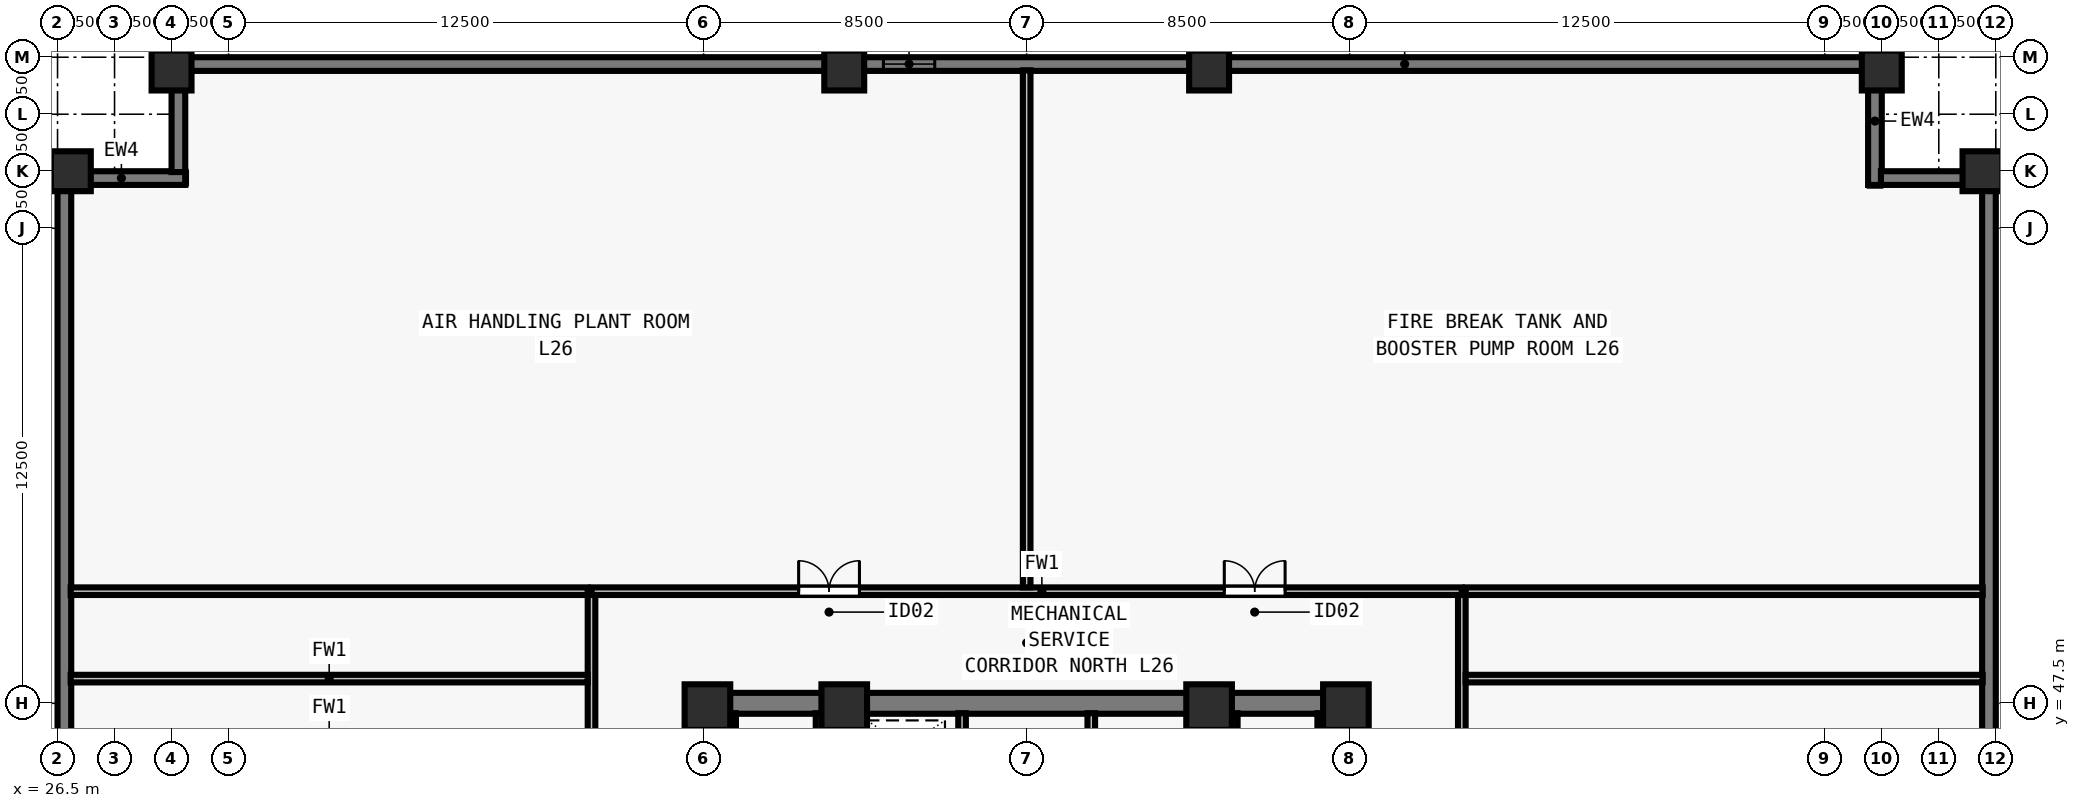
"""IFC4 building model, lengths in metres.
Left out: names, types, materials, properties, quantities, classifications, styles, units other than length and angle.
Written with IfcOpenShell. Run it as: python <this file> out.ifc"""

import sys

from ifc_helpers import new_model, si_unit, direction, frame, frame_2d, origin, origin_2d, place, context, subcontext, project, spatial, rectangle, extrude, element, fill, save


model = new_model("IFC4")
c1 = context("Model", 3, precision=1e-05, world=origin(), true_north=direction((0.0, 1.0)))
c2 = subcontext(c1, "Body", "Model", "MODEL_VIEW")
j1 = project(units=[si_unit("LENGTHUNIT", "METRE"), si_unit("PLANEANGLEUNIT", "RADIAN")], contexts=[c1])
p1 = place(None, origin())
s1 = spatial("IfcSite", under=j1, at=p1, CompositionType="ELEMENT")
p2 = place(p1, origin())
s2 = spatial("IfcBuilding", under=s1, at=p2, CompositionType="ELEMENT")
p3 = place(p2, frame((0.0, 0.0, 97.0)))
s3 = spatial("IfcBuildingStorey", under=s2, at=p3, CompositionType="ELEMENT", Elevation=97.0)
for number, where, z_axis, x_axis in (
    (1, (43.6, 47.4, 0.0), (0.0, 0.0, 1.0), (1.0, 0.0, 0.0)),
    (2, (47.2, 47.4, 0.0), (0.0, 0.0, 1.0), (1.0, 0.0, 0.0)),
    (3, (56.8, 47.4, 0.0), (0.0, 0.0, 1.0), (1.0, 0.0, 0.0)),
    (4, (60.4, 47.4, 0.0), (0.0, 0.0, 1.0), (1.0, 0.0, 0.0)),
):
    element("IfcColumn", number, at=place(p3, frame(where, z_axis=z_axis, x_axis=x_axis)), inside=s3, PredefinedType="COLUMN", context=c2, shape_type="SweptSolid", body=[
        extrude(rectangle(XDim=1.2, YDim=1.2, at=origin_2d()), origin(), (0.0, 0.0, 1.0), 4.5),
    ])
for number, where, z_axis, x_axis in (
    (5, (77.15, 61.5, 0.0), (0.0, 0.0, 1.0), (0.0, 1.0, 0.0)),
    (6, (74.5, 64.15, 0.0), (0.0, 0.0, 1.0), (1.0, 0.0, 0.0)),
    (7, (56.8, 64.15, 0.0), (0.0, 0.0, 1.0), (1.0, 0.0, 0.0)),
    (8, (47.2, 64.15, 0.0), (0.0, 0.0, 1.0), (1.0, 0.0, 0.0)),
    (9, (29.5, 64.15, 0.0), (0.0, 0.0, 1.0), (1.0, 0.0, 0.0)),
    (10, (26.85, 61.5, 0.0), (0.0, 0.0, 1.0), (0.0, 1.0, 0.0)),
):
    element("IfcColumn", number, at=place(p3, frame(where, z_axis=z_axis, x_axis=x_axis)), inside=s3, PredefinedType="COLUMN", context=c2, shape_type="SweptSolid", body=[
        extrude(rectangle(XDim=1.05, YDim=1.05, at=origin_2d()), origin(), (0.0, 0.0, 1.0), 4.5),
    ])
p4 = place(p3, frame((26.68, 16.5, 0.0), z_axis=(0.0, 0.0, 1.0), x_axis=(0.0, 1.0, 0.0)))
e11 = element("IfcWall", 11, at=p4, inside=s3, PredefinedType="SOLIDWALL", context=c2, shape_type="SweptSolid", body=[
    extrude(rectangle(XDim=44.662, YDim=0.36, at=frame_2d((22.331, 0.0))), origin(), (0.0, 0.0, 1.0), 4.28),
])
p5 = place(p3, frame((26.5, 61.32, 0.0), z_axis=(0.0, 0.0, 1.0), x_axis=(1.0, 0.0, 0.0)))
e12 = element("IfcWall", 12, at=p5, inside=s3, PredefinedType="SOLIDWALL", context=c2, shape_type="SweptSolid", body=[
    extrude(rectangle(XDim=3.36, YDim=0.36, at=frame_2d((1.68, 0.0))), origin(), (0.0, 0.0, 1.0), 4.28),
])
p6 = place(p3, frame((29.68, 61.478, 0.0), z_axis=(0.0, 0.0, 1.0), x_axis=(0.0, 1.0, 0.0)))
e13 = element("IfcWall", 13, at=p6, inside=s3, PredefinedType="SOLIDWALL", context=c2, shape_type="SweptSolid", body=[
    extrude(rectangle(XDim=2.684, YDim=0.36, at=frame_2d((1.342, 0.0))), origin(), (0.0, 0.0, 1.0), 4.28),
])
p7 = place(p3, frame((29.5, 64.32, 0.0), z_axis=(0.0, 0.0, 1.0), x_axis=(1.0, 0.0, 0.0)))
e14 = element("IfcWall", 14, at=p7, inside=s3, PredefinedType="SOLIDWALL", context=c2, shape_type="SweptSolid", body=[
    extrude(rectangle(XDim=44.662, YDim=0.36, at=frame_2d((22.331, 0.0))), origin(), (0.0, 0.0, 1.0), 4.28),
])
p8 = place(p7, frame((18.731, 0.0, 0.8)))
e15 = element("IfcOpeningElement", 15, at=p8, cuts=e14, PredefinedType="OPENING", context=c2, shape_type="SweptSolid", body=[
    extrude(rectangle(XDim=1.35, YDim=1.53, at=frame_2d((0.675, 0.765))), frame((0.0, 0.19, 0.0), z_axis=(0.0, -1.0, 0.0), x_axis=(1.0, 0.0, 0.0)), (0.0, 0.0, 1.0), 0.38),
])
p9 = place(p3, frame((74.32, 64.5, 0.0), z_axis=(0.0, 0.0, 1.0), x_axis=(0.0, -1.0, 0.0)))
e16 = element("IfcWall", 16, at=p9, inside=s3, PredefinedType="SOLIDWALL", context=c2, shape_type="SweptSolid", body=[
    extrude(rectangle(XDim=3.36, YDim=0.36, at=frame_2d((1.68, 0.0))), origin(), (0.0, 0.0, 1.0), 4.28),
])
p10 = place(p3, frame((74.478, 61.32, 0.0), z_axis=(0.0, 0.0, 1.0), x_axis=(1.0, 0.0, 0.0)))
e17 = element("IfcWall", 17, at=p10, inside=s3, PredefinedType="SOLIDWALL", context=c2, shape_type="SweptSolid", body=[
    extrude(rectangle(XDim=2.684, YDim=0.36, at=frame_2d((1.342, 0.0))), origin(), (0.0, 0.0, 1.0), 4.28),
])
p11 = place(p3, frame((77.32, 61.5, 0.0), z_axis=(0.0, 0.0, 1.0), x_axis=(0.0, -1.0, 0.0)))
e18 = element("IfcWall", 18, at=p11, inside=s3, PredefinedType="SOLIDWALL", context=c2, shape_type="SweptSolid", body=[
    extrude(rectangle(XDim=44.662, YDim=0.36, at=frame_2d((22.331, 0.0))), origin(), (0.0, 0.0, 1.0), 4.28),
])
p12 = place(p3, frame((43.225, 47.5, 0.0), z_axis=(0.0, 0.0, 1.0), x_axis=(1.0, 0.0, 0.0)))
e19 = element("IfcWall", 19, at=p12, inside=s3, PredefinedType="SHEAR", context=c2, shape_type="SweptSolid", body=[
    extrude(rectangle(XDim=17.55, YDim=0.55, at=frame_2d((8.775, 0.0))), origin(), (0.0, 0.0, 1.0), 4.28),
])
for number, where, z_axis, x_axis in (
    (20, (43.5, 40.8, 0.0), (0.0, 0.0, 1.0), (0.0, 1.0, 0.0)),
    (21, (60.5, 40.8, 0.0), (0.0, 0.0, 1.0), (0.0, 1.0, 0.0)),
):
    element("IfcWall", number, at=place(p3, frame(where, z_axis=z_axis, x_axis=x_axis)), inside=s3, PredefinedType="SHEAR", context=c2, shape_type="SweptSolid", body=[
        extrude(rectangle(XDim=6.435, YDim=0.55, at=frame_2d((3.218, 0.0))), origin(), (0.0, 0.0, 1.0), 4.28),
    ])
p13 = place(p3, frame((50.3, 40.585, 0.0), z_axis=(0.0, 0.0, 1.0), x_axis=(0.0, 1.0, 0.0)))
e22 = element("IfcWall", 22, at=p13, inside=s3, PredefinedType="SOLIDWALL", context=c2, shape_type="SweptSolid", body=[
    extrude(rectangle(XDim=6.655, YDim=0.2, at=frame_2d((3.328, 0.0))), origin(), (0.0, 0.0, 1.0), 4.28),
])
p14 = place(p13, frame((5.065, 0.0, 0.0)))
e23 = element("IfcOpeningElement", 23, at=p14, cuts=e22, PredefinedType="OPENING", context=c2, shape_type="SweptSolid", body=[
    extrude(rectangle(XDim=0.8, YDim=2.08, at=frame_2d((0.4, 1.04))), frame((0.0, 0.11, 0.0), z_axis=(0.0, -1.0, 0.0), x_axis=(1.0, 0.0, 0.0)), (0.0, 0.0, 1.0), 0.22),
])
p15 = place(p3, frame((53.7, 40.585, 0.0), z_axis=(0.0, 0.0, 1.0), x_axis=(0.0, 1.0, 0.0)))
e24 = element("IfcWall", 24, at=p15, inside=s3, PredefinedType="SOLIDWALL", context=c2, shape_type="SweptSolid", body=[
    extrude(rectangle(XDim=6.655, YDim=0.2, at=frame_2d((3.328, 0.0))), origin(), (0.0, 0.0, 1.0), 4.28),
])
p16 = place(p15, frame((0.195, 0.0, 0.0)))
e25 = element("IfcOpeningElement", 25, at=p16, cuts=e24, PredefinedType="OPENING", context=c2, shape_type="SweptSolid", body=[
    extrude(rectangle(XDim=0.8, YDim=2.08, at=frame_2d((0.4, 1.04))), frame((0.0, 0.11, 0.0), z_axis=(0.0, -1.0, 0.0), x_axis=(1.0, 0.0, 0.0)), (0.0, 0.0, 1.0), 0.22),
])
p17 = place(p15, frame((3.735, 0.0, 0.0)))
e26 = element("IfcOpeningElement", 26, at=p17, cuts=e24, PredefinedType="OPENING", context=c2, shape_type="SweptSolid", body=[
    extrude(rectangle(XDim=0.9, YDim=2.12, at=frame_2d((0.45, 1.06))), frame((0.0, 0.11, 0.0), z_axis=(0.0, -1.0, 0.0), x_axis=(1.0, 0.0, 0.0)), (0.0, 0.0, 1.0), 0.22),
])
p18 = place(p15, frame((5.395, 0.0, 0.0)))
e27 = element("IfcOpeningElement", 27, at=p18, cuts=e24, PredefinedType="OPENING", context=c2, shape_type="SweptSolid", body=[
    extrude(rectangle(XDim=0.8, YDim=2.1, at=frame_2d((0.4, 1.05))), frame((0.0, 0.11, 0.0), z_axis=(0.0, -1.0, 0.0), x_axis=(1.0, 0.0, 0.0)), (0.0, 0.0, 1.0), 0.22),
])
for number, where, z_axis, x_axis in (
    (28, (46.55, 43.735, 0.0), (0.0, 0.0, 1.0), (0.0, 1.0, 0.0)),
    (29, (44.25, 43.735, 0.0), (0.0, 0.0, 1.0), (0.0, 1.0, 0.0)),
    (30, (57.45, 43.735, 0.0), (0.0, 0.0, 1.0), (0.0, 1.0, 0.0)),
    (31, (59.75, 43.735, 0.0), (0.0, 0.0, 1.0), (0.0, 1.0, 0.0)),
):
    element("IfcWall", number, at=place(p3, frame(where, z_axis=z_axis, x_axis=x_axis)), inside=s3, PredefinedType="SOLIDWALL", context=c2, shape_type="SweptSolid", body=[
        extrude(rectangle(XDim=3.505, YDim=0.2, at=frame_2d((1.752, 0.0))), origin(), (0.0, 0.0, 1.0), 4.28),
    ])
for number, where, z_axis, x_axis in (
    (32, (47.35, 43.735, 0.0), (0.0, 0.0, 1.0), (0.0, 1.0, 0.0)),
    (33, (56.65, 43.735, 0.0), (0.0, 0.0, 1.0), (0.0, 1.0, 0.0)),
):
    element("IfcWall", number, at=place(p3, frame(where, z_axis=z_axis, x_axis=x_axis)), inside=s3, PredefinedType="SOLIDWALL", context=c2, shape_type="SweptSolid", body=[
        extrude(rectangle(XDim=3.505, YDim=0.18, at=frame_2d((1.752, 0.0))), origin(), (0.0, 0.0, 1.0), 4.28),
    ])
p19 = place(p3, frame((40.55, 50.45, 0.0), z_axis=(0.0, 0.0, 1.0), x_axis=(1.0, 0.0, 0.0)))
e34 = element("IfcWall", 34, at=p19, inside=s3, PredefinedType="SOLIDWALL", context=c2, shape_type="SweptSolid", body=[
    extrude(rectangle(XDim=22.9, YDim=0.2, at=frame_2d((11.45, 0.0))), origin(), (0.0, 0.0, 1.0), 4.28),
])
p20 = place(p19, frame((5.45, 0.0, 0.0)))
e35 = element("IfcOpeningElement", 35, at=p20, cuts=e34, PredefinedType="OPENING", context=c2, shape_type="SweptSolid", body=[
    extrude(rectangle(XDim=1.6, YDim=2.2, at=frame_2d((0.8, 1.1))), frame((0.0, 0.11, 0.0), z_axis=(0.0, -1.0, 0.0), x_axis=(1.0, 0.0, 0.0)), (0.0, 0.0, 1.0), 0.22),
])
p21 = place(p19, frame((16.65, 0.0, 0.0)))
e36 = element("IfcOpeningElement", 36, at=p21, cuts=e34, PredefinedType="OPENING", context=c2, shape_type="SweptSolid", body=[
    extrude(rectangle(XDim=1.6, YDim=2.2, at=frame_2d((0.8, 1.1))), frame((0.0, 0.11, 0.0), z_axis=(0.0, -1.0, 0.0), x_axis=(1.0, 0.0, 0.0)), (0.0, 0.0, 1.0), 0.22),
])
p22 = place(p3, frame((40.55, 27.65, 0.0), z_axis=(0.0, 0.0, 1.0), x_axis=(0.0, 1.0, 0.0)))
e37 = element("IfcWall", 37, at=p22, inside=s3, PredefinedType="SOLIDWALL", context=c2, shape_type="SweptSolid", body=[
    extrude(rectangle(XDim=22.7, YDim=0.2, at=frame_2d((11.35, 0.0))), origin(), (0.0, 0.0, 1.0), 4.28),
])
p23 = place(p22, frame((9.2, 0.0, 0.0)))
e38 = element("IfcOpeningElement", 38, at=p23, cuts=e37, PredefinedType="OPENING", context=c2, shape_type="SweptSolid", body=[
    extrude(rectangle(XDim=1.6, YDim=2.2, at=frame_2d((0.8, 1.1))), frame((0.0, 0.11, 0.0), z_axis=(0.0, -1.0, 0.0), x_axis=(1.0, 0.0, 0.0)), (0.0, 0.0, 1.0), 0.22),
])
p24 = place(p3, frame((63.45, 27.65, 0.0), z_axis=(0.0, 0.0, 1.0), x_axis=(0.0, 1.0, 0.0)))
e39 = element("IfcWall", 39, at=p24, inside=s3, PredefinedType="SOLIDWALL", context=c2, shape_type="SweptSolid", body=[
    extrude(rectangle(XDim=22.7, YDim=0.2, at=frame_2d((11.35, 0.0))), origin(), (0.0, 0.0, 1.0), 4.28),
])
p25 = place(p24, frame((9.2, 0.0, 0.0)))
e40 = element("IfcOpeningElement", 40, at=p25, cuts=e39, PredefinedType="OPENING", context=c2, shape_type="SweptSolid", body=[
    extrude(rectangle(XDim=1.6, YDim=2.2, at=frame_2d((0.8, 1.1))), frame((0.0, 0.11, 0.0), z_axis=(0.0, -1.0, 0.0), x_axis=(1.0, 0.0, 0.0)), (0.0, 0.0, 1.0), 0.22),
])
for number, where, z_axis, x_axis in (
    (41, (26.845, 48.15, 0.0), (0.0, 0.0, 1.0), (1.0, 0.0, 0.0)),
    (42, (63.55, 48.15, 0.0), (0.0, 0.0, 1.0), (1.0, 0.0, 0.0)),
):
    element("IfcWall", number, at=place(p3, frame(where, z_axis=z_axis, x_axis=x_axis)), inside=s3, PredefinedType="SOLIDWALL", context=c2, shape_type="SweptSolid", body=[
        extrude(rectangle(XDim=13.605, YDim=0.2, at=frame_2d((6.802, 0.0))), origin(), (0.0, 0.0, 1.0), 4.28),
    ])
for number, where, z_axis, x_axis in (
    (43, (52.0, 50.55, 0.0), (0.0, 0.0, 1.0), (0.0, 1.0, 0.0)),
    (44, (26.845, 50.45, 0.0), (0.0, 0.0, 1.0), (1.0, 0.0, 0.0)),
    (45, (63.55, 50.45, 0.0), (0.0, 0.0, 1.0), (1.0, 0.0, 0.0)),
):
    element("IfcWall", number, at=place(p3, frame(where, z_axis=z_axis, x_axis=x_axis)), inside=s3, PredefinedType="SOLIDWALL", context=c2, shape_type="SweptSolid", body=[
        extrude(rectangle(XDim=13.605, YDim=0.2, at=frame_2d((6.802, 0.0))), origin(), (0.0, 0.0, 1.0), 3.849),
    ])
p26 = place(p8, origin())
e46 = element("IfcWindow", 46, at=p26, inside=s3, PartitioningType="SINGLE_PANEL", PredefinedType="WINDOW", context=c2, shape_type="SweptSolid", body=[
    extrude(rectangle(XDim=1.35, YDim=1.53, at=frame_2d((0.675, 0.765))), frame((0.0, -0.04, 0.0), z_axis=(0.0, -1.0, 0.0), x_axis=(1.0, 0.0, 0.0)), (0.0, 0.0, 1.0), 0.06),
])
fill(e15, e46)
p27 = place(p20, origin())
e47 = element("IfcDoor", 47, at=p27, inside=s3, OperationType="DOUBLE_DOOR_SINGLE_SWING", PredefinedType="DOOR", context=c2, shape_type="SweptSolid", body=[
    extrude(rectangle(XDim=1.6, YDim=2.2, at=frame_2d((0.8, 1.1))), frame((0.0, 0.025, 0.0), z_axis=(0.0, -1.0, 0.0), x_axis=(1.0, 0.0, 0.0)), (0.0, 0.0, 1.0), 0.05),
])
fill(e35, e47)
p28 = place(p21, origin())
e48 = element("IfcDoor", 48, at=p28, inside=s3, OperationType="DOUBLE_DOOR_SINGLE_SWING", PredefinedType="DOOR", context=c2, shape_type="SweptSolid", body=[
    extrude(rectangle(XDim=1.6, YDim=2.2, at=frame_2d((0.8, 1.1))), frame((0.0, 0.025, 0.0), z_axis=(0.0, -1.0, 0.0), x_axis=(1.0, 0.0, 0.0)), (0.0, 0.0, 1.0), 0.05),
])
fill(e36, e48)
save(model, sys.argv[1])
